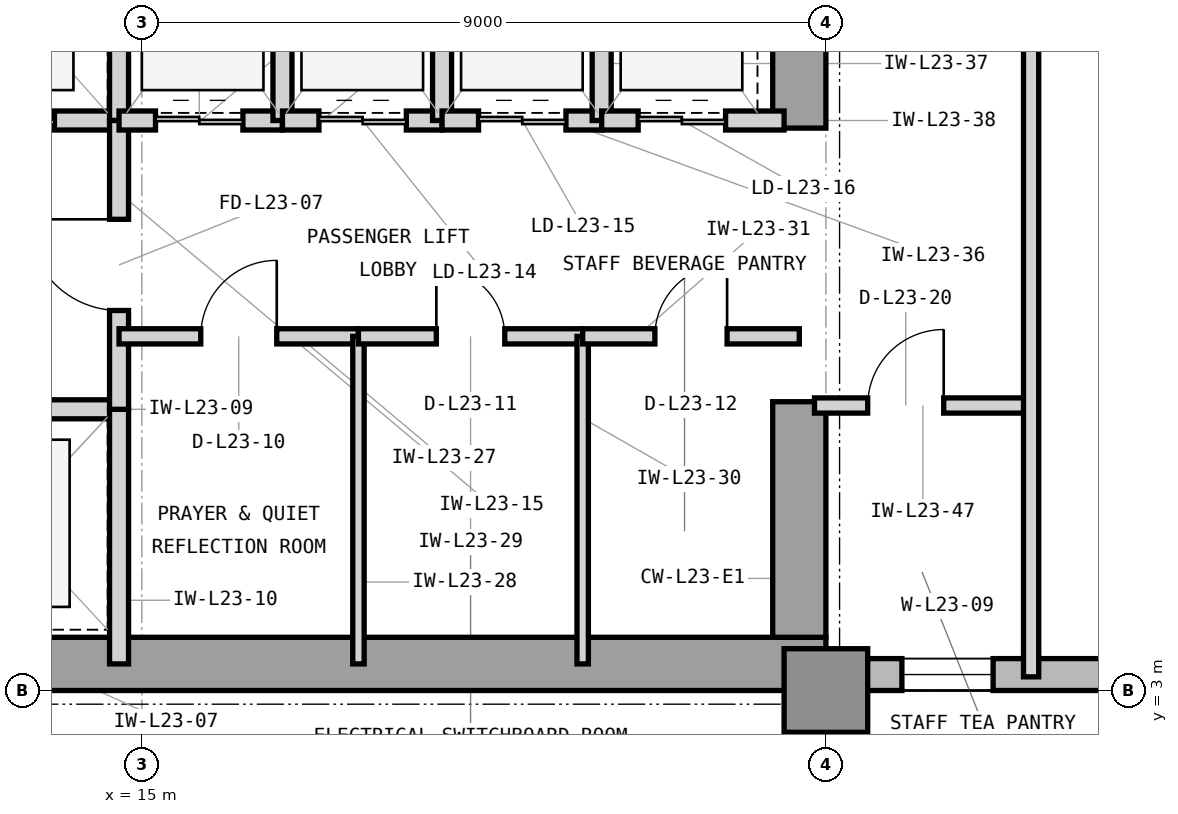
"""IFC4 building model, lengths in metres.
Left out: names, types, materials, properties, quantities, classifications, styles, units other than length and angle.
Written with IfcOpenShell. Run it as: python <this file> out.ifc"""

import sys

from ifc_helpers import new_model, si_unit, direction, frame, frame_2d, origin, origin_2d, place, context, subcontext, project, spatial, rectangle, extrude, element, fill, save


model = new_model("IFC4")
c1 = context("Model", 3, precision=1e-05, world=origin(), true_north=direction((0.0, 1.0)))
c2 = subcontext(c1, "Body", "Model", "MODEL_VIEW")
j1 = project(units=[si_unit("LENGTHUNIT", "METRE"), si_unit("PLANEANGLEUNIT", "RADIAN")], contexts=[c1])
p1 = place(None, origin())
s1 = spatial("IfcSite", under=j1, at=p1, CompositionType="ELEMENT")
p2 = place(p1, origin())
s2 = spatial("IfcBuilding", under=s1, at=p2, CompositionType="ELEMENT")
p3 = place(p2, frame((0.0, 0.0, 101.1)))
s3 = spatial("IfcBuildingStorey", under=s2, at=p3, CompositionType="ELEMENT", Elevation=101.1)
p4 = place(p3, frame((7.475, 3.35, 0.0), z_axis=(0.0, 0.0, 1.0), x_axis=(1.0, 0.0, 0.0)))
e1 = element("IfcWall", 1, at=p4, inside=s3, PredefinedType="SHEAR", context=c2, shape_type="SweptSolid", body=[
    extrude(rectangle(XDim=16.525, YDim=0.7, at=frame_2d((8.262, 0.0))), origin(), (0.0, 0.0, 1.0), 3.9),
])
p5 = place(p3, frame((23.65, 3.7, 0.0), z_axis=(0.0, 0.0, 1.0), x_axis=(0.0, 1.0, 0.0)))
e2 = element("IfcWall", 2, at=p5, inside=s3, PredefinedType="SHEAR", context=c2, shape_type="SweptSolid", body=[
    extrude(rectangle(XDim=3.1, YDim=0.7, at=frame_2d((1.55, 0.0))), origin(), (0.0, 0.0, 1.0), 3.9),
])
p6 = place(p3, frame((23.65, 10.4, 0.0), z_axis=(0.0, 0.0, 1.0), x_axis=(0.0, 1.0, 0.0)))
e3 = element("IfcWall", 3, at=p6, inside=s3, PredefinedType="SHEAR", context=c2, shape_type="SweptSolid", body=[
    extrude(rectangle(XDim=3.2, YDim=0.7, at=frame_2d((1.6, 0.0))), origin(), (0.0, 0.0, 1.0), 3.9),
])
p7 = place(p3, frame((24.0, 3.0, 0.0), z_axis=(0.0, 0.0, 1.0), x_axis=(1.0, 0.0, 0.0)))
e4 = element("IfcColumn", 4, at=p7, inside=s3, PredefinedType="COLUMN", context=c2, shape_type="SweptSolid", body=[
    extrude(rectangle(XDim=1.1, YDim=1.1, at=origin_2d()), origin(), (0.0, 0.0, 1.0), 3.9),
])
p8 = place(p3, frame((23.9, 3.21, 0.0), z_axis=(0.0, 0.0, 1.0), x_axis=(1.0, 0.0, 0.0)))
e5 = element("IfcWall", 5, at=p8, inside=s3, PredefinedType="STANDARD", context=c2, shape_type="SweptSolid", body=[
    extrude(rectangle(XDim=37.5, YDim=0.42, at=frame_2d((18.75, 0.0))), origin(), (0.0, 0.0, 1.0), 3.7),
])
p9 = place(p8, frame((19.844, 0.0, 0.85)))
e6 = element("IfcOpeningElement", 6, at=p9, cuts=e5, PredefinedType="OPENING", context=c2, shape_type="SweptSolid", body=[
    extrude(rectangle(XDim=2.5, YDim=2.25, at=frame_2d((1.25, 1.125))), frame((0.0, 0.22, 0.0), z_axis=(0.0, -1.0, 0.0), x_axis=(1.0, 0.0, 0.0)), (0.0, 0.0, 1.0), 0.44),
])
p10 = place(p8, frame((1.1, 0.0, 0.85)))
e7 = element("IfcOpeningElement", 7, at=p10, cuts=e5, PredefinedType="OPENING", context=c2, shape_type="SweptSolid", body=[
    extrude(rectangle(XDim=1.2, YDim=2.25, at=frame_2d((0.6, 1.125))), frame((0.0, 0.22, 0.0), z_axis=(0.0, -1.0, 0.0), x_axis=(1.0, 0.0, 0.0)), (0.0, 0.0, 1.0), 0.44),
])
p11 = place(p8, frame((5.286, 0.0, 0.85)))
e8 = element("IfcOpeningElement", 8, at=p11, cuts=e5, PredefinedType="OPENING", context=c2, shape_type="SweptSolid", body=[
    extrude(rectangle(XDim=2.5, YDim=2.25, at=frame_2d((1.25, 1.125))), frame((0.0, 0.22, 0.0), z_axis=(0.0, -1.0, 0.0), x_axis=(1.0, 0.0, 0.0)), (0.0, 0.0, 1.0), 0.44),
])
p12 = place(p8, frame((13.036, 0.0, 0.85)))
e9 = element("IfcOpeningElement", 9, at=p12, cuts=e5, PredefinedType="OPENING", context=c2, shape_type="SweptSolid", body=[
    extrude(rectangle(XDim=2.5, YDim=2.25, at=frame_2d((1.25, 1.125))), frame((0.0, 0.22, 0.0), z_axis=(0.0, -1.0, 0.0), x_axis=(1.0, 0.0, 0.0)), (0.0, 0.0, 1.0), 0.44),
])
p13 = place(p8, frame((27.986, 0.0, 0.85)))
e10 = element("IfcOpeningElement", 10, at=p13, cuts=e5, PredefinedType="OPENING", context=c2, shape_type="SweptSolid", body=[
    extrude(rectangle(XDim=1.2, YDim=2.25, at=frame_2d((0.6, 1.125))), frame((0.0, 0.22, 0.0), z_axis=(0.0, -1.0, 0.0), x_axis=(1.0, 0.0, 0.0)), (0.0, 0.0, 1.0), 0.44),
])
p14 = place(p3, frame((11.82, 6.7, 0.0), z_axis=(0.0, 0.0, 1.0), x_axis=(1.0, 0.0, 0.0)))
e11 = element("IfcWall", 11, at=p14, inside=s3, PredefinedType="PARTITIONING", context=c2, shape_type="SweptSolid", body=[
    extrude(rectangle(XDim=2.88, YDim=0.25, at=frame_2d((1.44, 0.0))), origin(), (0.0, 0.0, 1.0), 3.227),
])
p15 = place(p14, frame((0.85, 0.0, 0.0)))
e12 = element("IfcOpeningElement", 12, at=p15, cuts=e11, PredefinedType="OPENING", context=c2, shape_type="SweptSolid", body=[
    extrude(rectangle(XDim=1.1, YDim=2.25, at=frame_2d((0.55, 1.125))), frame((0.0, 0.135, 0.0), z_axis=(0.0, -1.0, 0.0), x_axis=(1.0, 0.0, 0.0)), (0.0, 0.0, 1.0), 0.27),
])
p16 = place(p3, frame((14.7, 3.35, 0.0), z_axis=(0.0, 0.0, 1.0), x_axis=(0.0, 1.0, 0.0)))
e13 = element("IfcWall", 13, at=p16, inside=s3, PredefinedType="PARTITIONING", context=c2, shape_type="SweptSolid", body=[
    extrude(rectangle(XDim=3.35, YDim=0.25, at=frame_2d((1.675, 0.0))), origin(), (0.0, 0.0, 1.0), 3.69),
])
p17 = place(p3, frame((11.95, 10.5, 0.0), z_axis=(0.0, 0.0, 1.0), x_axis=(1.0, 0.0, 0.0)))
e14 = element("IfcWall", 14, at=p17, inside=s3, PredefinedType="PARTITIONING", context=c2, shape_type="SweptSolid", body=[
    extrude(rectangle(XDim=2.75, YDim=0.25, at=frame_2d((1.375, 0.0))), origin(), (0.0, 0.0, 1.0), 3.227),
])
p18 = place(p17, frame((0.8, 0.0, 0.0)))
e15 = element("IfcOpeningElement", 15, at=p18, cuts=e14, PredefinedType="OPENING", context=c2, shape_type="SweptSolid", body=[
    extrude(rectangle(XDim=1.1, YDim=2.25, at=frame_2d((0.55, 1.125))), frame((0.0, 0.135, 0.0), z_axis=(0.0, -1.0, 0.0), x_axis=(1.0, 0.0, 0.0)), (0.0, 0.0, 1.0), 0.27),
])
p19 = place(p3, frame((14.7, 10.5, 0.0), z_axis=(0.0, 0.0, 1.0), x_axis=(0.0, 1.0, 0.0)))
e16 = element("IfcWall", 16, at=p19, inside=s3, PredefinedType="PARTITIONING", context=c2, shape_type="SweptSolid", body=[
    extrude(rectangle(XDim=3.0, YDim=0.25, at=frame_2d((1.5, 0.0))), origin(), (0.0, 0.0, 1.0), 3.69),
])
p20 = place(p3, frame((14.7, 6.7, 0.0), z_axis=(0.0, 0.0, 1.0), x_axis=(0.0, 1.0, 0.0)))
e17 = element("IfcWall", 17, at=p20, inside=s3, PredefinedType="PARTITIONING", context=c2, shape_type="SweptSolid", body=[
    extrude(rectangle(XDim=3.8, YDim=0.25, at=frame_2d((1.9, 0.0))), origin(), (0.0, 0.0, 1.0), 3.69),
])
p21 = place(p20, frame((1.3, 0.0, 0.0)))
e18 = element("IfcOpeningElement", 18, at=p21, cuts=e17, PredefinedType="OPENING", context=c2, shape_type="SweptSolid", body=[
    extrude(rectangle(XDim=1.2, YDim=2.2, at=frame_2d((0.6, 1.1))), frame((0.0, 0.135, 0.0), z_axis=(0.0, -1.0, 0.0), x_axis=(1.0, 0.0, 0.0)), (0.0, 0.0, 1.0), 0.27),
])
p22 = place(p3, frame((14.7, 7.66, 0.0), z_axis=(0.0, 0.0, 1.0), x_axis=(1.0, 0.0, 0.0)))
e19 = element("IfcWall", 19, at=p22, inside=s3, PredefinedType="PARTITIONING", context=c2, shape_type="SweptSolid", body=[
    extrude(rectangle(XDim=3.15, YDim=0.2, at=frame_2d((1.575, 0.0))), origin(), (0.0, 0.0, 1.0), 3.69),
])
p23 = place(p22, frame((1.075, 0.0, 0.0)))
e20 = element("IfcOpeningElement", 20, at=p23, cuts=e19, PredefinedType="OPENING", context=c2, shape_type="SweptSolid", body=[
    extrude(rectangle(XDim=1.0, YDim=2.15, at=frame_2d((0.5, 1.075))), frame((0.0, 0.11, 0.0), z_axis=(0.0, -1.0, 0.0), x_axis=(1.0, 0.0, 0.0)), (0.0, 0.0, 1.0), 0.22),
])
p24 = place(p3, frame((17.85, 3.35, 0.0), z_axis=(0.0, 0.0, 1.0), x_axis=(0.0, 1.0, 0.0)))
e21 = element("IfcWall", 21, at=p24, inside=s3, PredefinedType="PARTITIONING", context=c2, shape_type="SweptSolid", body=[
    extrude(rectangle(XDim=4.31, YDim=0.15, at=frame_2d((2.155, 0.0))), origin(), (0.0, 0.0, 1.0), 3.69),
])
p25 = place(p3, frame((17.85, 7.66, 0.0), z_axis=(0.0, 0.0, 1.0), x_axis=(1.0, 0.0, 0.0)))
e22 = element("IfcWall", 22, at=p25, inside=s3, PredefinedType="PARTITIONING", context=c2, shape_type="SweptSolid", body=[
    extrude(rectangle(XDim=2.95, YDim=0.2, at=frame_2d((1.475, 0.0))), origin(), (0.0, 0.0, 1.0), 3.69),
])
p26 = place(p25, frame((1.025, 0.0, 0.0)))
e23 = element("IfcOpeningElement", 23, at=p26, cuts=e22, PredefinedType="OPENING", context=c2, shape_type="SweptSolid", body=[
    extrude(rectangle(XDim=0.9, YDim=2.1, at=frame_2d((0.45, 1.05))), frame((0.0, 0.11, 0.0), z_axis=(0.0, -1.0, 0.0), x_axis=(1.0, 0.0, 0.0)), (0.0, 0.0, 1.0), 0.22),
])
p27 = place(p3, frame((20.8, 3.35, 0.0), z_axis=(0.0, 0.0, 1.0), x_axis=(0.0, 1.0, 0.0)))
e24 = element("IfcWall", 24, at=p27, inside=s3, PredefinedType="PARTITIONING", context=c2, shape_type="SweptSolid", body=[
    extrude(rectangle(XDim=4.31, YDim=0.15, at=frame_2d((2.155, 0.0))), origin(), (0.0, 0.0, 1.0), 3.69),
])
p28 = place(p3, frame((20.8, 7.66, 0.0), z_axis=(0.0, 0.0, 1.0), x_axis=(1.0, 0.0, 0.0)))
e25 = element("IfcWall", 25, at=p28, inside=s3, PredefinedType="PARTITIONING", context=c2, shape_type="SweptSolid", body=[
    extrude(rectangle(XDim=2.85, YDim=0.2, at=frame_2d((1.425, 0.0))), origin(), (0.0, 0.0, 1.0), 3.69),
])
p29 = place(p28, frame((0.95, 0.0, 0.0)))
e26 = element("IfcOpeningElement", 26, at=p29, cuts=e25, PredefinedType="OPENING", context=c2, shape_type="SweptSolid", body=[
    extrude(rectangle(XDim=0.95, YDim=2.1, at=frame_2d((0.475, 1.05))), frame((0.0, 0.11, 0.0), z_axis=(0.0, -1.0, 0.0), x_axis=(1.0, 0.0, 0.0)), (0.0, 0.0, 1.0), 0.22),
])
p30 = place(p3, frame((14.7, 10.5, 0.0), z_axis=(0.0, 0.0, 1.0), x_axis=(1.0, 0.0, 0.0)))
e27 = element("IfcWall", 27, at=p30, inside=s3, PredefinedType="PARTITIONING", context=c2, shape_type="SweptSolid", body=[
    extrude(rectangle(XDim=2.15, YDim=0.25, at=frame_2d((1.075, 0.0))), origin(), (0.0, 0.0, 1.0), 3.227),
])
p31 = place(p30, frame((0.48, 0.0, 0.0)))
e28 = element("IfcOpeningElement", 28, at=p31, cuts=e27, PredefinedType="OPENING", context=c2, shape_type="SweptSolid", body=[
    extrude(rectangle(XDim=1.15, YDim=2.25, at=frame_2d((0.575, 1.125))), frame((0.0, 0.135, 0.0), z_axis=(0.0, -1.0, 0.0), x_axis=(1.0, 0.0, 0.0)), (0.0, 0.0, 1.0), 0.27),
])
p32 = place(p3, frame((16.85, 10.5, 0.0), z_axis=(0.0, 0.0, 1.0), x_axis=(0.0, 1.0, 0.0)))
e29 = element("IfcWall", 29, at=p32, inside=s3, PredefinedType="PARTITIONING", context=c2, shape_type="SweptSolid", body=[
    extrude(rectangle(XDim=3.0, YDim=0.25, at=frame_2d((1.5, 0.0))), origin(), (0.0, 0.0, 1.0), 3.69),
])
p33 = place(p3, frame((16.85, 10.5, 0.0), z_axis=(0.0, 0.0, 1.0), x_axis=(1.0, 0.0, 0.0)))
e30 = element("IfcWall", 30, at=p33, inside=s3, PredefinedType="PARTITIONING", context=c2, shape_type="SweptSolid", body=[
    extrude(rectangle(XDim=2.1, YDim=0.25, at=frame_2d((1.05, 0.0))), origin(), (0.0, 0.0, 1.0), 3.227),
])
p34 = place(p33, frame((0.48, 0.0, 0.0)))
e31 = element("IfcOpeningElement", 31, at=p34, cuts=e30, PredefinedType="OPENING", context=c2, shape_type="SweptSolid", body=[
    extrude(rectangle(XDim=1.15, YDim=2.25, at=frame_2d((0.575, 1.125))), frame((0.0, 0.135, 0.0), z_axis=(0.0, -1.0, 0.0), x_axis=(1.0, 0.0, 0.0)), (0.0, 0.0, 1.0), 0.27),
])
p35 = place(p3, frame((18.95, 10.5, 0.0), z_axis=(0.0, 0.0, 1.0), x_axis=(0.0, 1.0, 0.0)))
e32 = element("IfcWall", 32, at=p35, inside=s3, PredefinedType="PARTITIONING", context=c2, shape_type="SweptSolid", body=[
    extrude(rectangle(XDim=3.0, YDim=0.25, at=frame_2d((1.5, 0.0))), origin(), (0.0, 0.0, 1.0), 3.69),
])
p36 = place(p3, frame((18.95, 10.5, 0.0), z_axis=(0.0, 0.0, 1.0), x_axis=(1.0, 0.0, 0.0)))
e33 = element("IfcWall", 33, at=p36, inside=s3, PredefinedType="PARTITIONING", context=c2, shape_type="SweptSolid", body=[
    extrude(rectangle(XDim=2.1, YDim=0.25, at=frame_2d((1.05, 0.0))), origin(), (0.0, 0.0, 1.0), 3.227),
])
p37 = place(p36, frame((0.48, 0.0, 0.0)))
e34 = element("IfcOpeningElement", 34, at=p37, cuts=e33, PredefinedType="OPENING", context=c2, shape_type="SweptSolid", body=[
    extrude(rectangle(XDim=1.15, YDim=2.25, at=frame_2d((0.575, 1.125))), frame((0.0, 0.135, 0.0), z_axis=(0.0, -1.0, 0.0), x_axis=(1.0, 0.0, 0.0)), (0.0, 0.0, 1.0), 0.27),
])
p38 = place(p3, frame((21.05, 10.5, 0.0), z_axis=(0.0, 0.0, 1.0), x_axis=(0.0, 1.0, 0.0)))
e35 = element("IfcWall", 35, at=p38, inside=s3, PredefinedType="PARTITIONING", context=c2, shape_type="SweptSolid", body=[
    extrude(rectangle(XDim=3.0, YDim=0.25, at=frame_2d((1.5, 0.0))), origin(), (0.0, 0.0, 1.0), 3.69),
])
p39 = place(p3, frame((21.05, 10.5, 0.0), z_axis=(0.0, 0.0, 1.0), x_axis=(1.0, 0.0, 0.0)))
e36 = element("IfcWall", 36, at=p39, inside=s3, PredefinedType="PARTITIONING", context=c2, shape_type="SweptSolid", body=[
    extrude(rectangle(XDim=2.4, YDim=0.25, at=frame_2d((1.2, 0.0))), origin(), (0.0, 0.0, 1.0), 3.227),
])
p40 = place(p39, frame((0.48, 0.0, 0.0)))
e37 = element("IfcOpeningElement", 37, at=p40, cuts=e36, PredefinedType="OPENING", context=c2, shape_type="SweptSolid", body=[
    extrude(rectangle(XDim=1.15, YDim=2.25, at=frame_2d((0.575, 1.125))), frame((0.0, 0.135, 0.0), z_axis=(0.0, -1.0, 0.0), x_axis=(1.0, 0.0, 0.0)), (0.0, 0.0, 1.0), 0.27),
])
p41 = place(p3, frame((23.85, 6.75, 0.0), z_axis=(0.0, 0.0, 1.0), x_axis=(1.0, 0.0, 0.0)))
e38 = element("IfcWall", 38, at=p41, inside=s3, PredefinedType="PARTITIONING", context=c2, shape_type="SweptSolid", body=[
    extrude(rectangle(XDim=2.85, YDim=0.2, at=frame_2d((1.425, 0.0))), origin(), (0.0, 0.0, 1.0), 3.69),
])
p42 = place(p41, frame((0.7, 0.0, 0.0)))
e39 = element("IfcOpeningElement", 39, at=p42, cuts=e38, PredefinedType="OPENING", context=c2, shape_type="SweptSolid", body=[
    extrude(rectangle(XDim=1.0, YDim=2.15, at=frame_2d((0.5, 1.075))), frame((0.0, 0.11, 0.0), z_axis=(0.0, -1.0, 0.0), x_axis=(1.0, 0.0, 0.0)), (0.0, 0.0, 1.0), 0.22),
])
p43 = place(p3, frame((26.7, 3.18, 0.0), z_axis=(0.0, 0.0, 1.0), x_axis=(0.0, 1.0, 0.0)))
e40 = element("IfcWall", 40, at=p43, inside=s3, PredefinedType="PARTITIONING", context=c2, shape_type="SweptSolid", body=[
    extrude(rectangle(XDim=14.82, YDim=0.2, at=frame_2d((7.41, 0.0))), origin(), (0.0, 0.0, 1.0), 3.69),
])
p44 = place(p18, origin())
e41 = element("IfcDoor", 41, at=p44, inside=s3, OperationType="DOUBLE_DOOR_SLIDING", PredefinedType="DOOR", context=c2, shape_type="SweptSolid", body=[
    extrude(rectangle(XDim=1.1, YDim=2.25, at=frame_2d((0.55, 1.125))), frame((0.0, 0.025, 0.0), z_axis=(0.0, -1.0, 0.0), x_axis=(1.0, 0.0, 0.0)), (0.0, 0.0, 1.0), 0.05),
])
fill(e15, e41)
p45 = place(p21, origin())
e42 = element("IfcDoor", 42, at=p45, inside=s3, OperationType="SINGLE_SWING_RIGHT", PredefinedType="DOOR", context=c2, shape_type="SweptSolid", body=[
    extrude(rectangle(XDim=1.2, YDim=2.2, at=frame_2d((0.6, 1.1))), frame((0.0, 0.025, 0.0), z_axis=(0.0, -1.0, 0.0), x_axis=(1.0, 0.0, 0.0)), (0.0, 0.0, 1.0), 0.05),
])
fill(e18, e42)
p46 = place(p23, origin())
e43 = element("IfcDoor", 43, at=p46, inside=s3, OperationType="SINGLE_SWING_RIGHT", PredefinedType="DOOR", context=c2, shape_type="SweptSolid", body=[
    extrude(rectangle(XDim=1.0, YDim=2.15, at=frame_2d((0.5, 1.075))), frame((0.0, 0.025, 0.0), z_axis=(0.0, -1.0, 0.0), x_axis=(1.0, 0.0, 0.0)), (0.0, 0.0, 1.0), 0.05),
])
fill(e20, e43)
p47 = place(p26, origin())
e44 = element("IfcDoor", 44, at=p47, inside=s3, OperationType="SINGLE_SWING_LEFT", PredefinedType="TRAPDOOR", context=c2, shape_type="SweptSolid", body=[
    extrude(rectangle(XDim=0.9, YDim=2.1, at=frame_2d((0.45, 1.05))), frame((0.0, 0.025, 0.0), z_axis=(0.0, -1.0, 0.0), x_axis=(1.0, 0.0, 0.0)), (0.0, 0.0, 1.0), 0.05),
])
fill(e23, e44)
p48 = place(p29, origin())
e45 = element("IfcDoor", 45, at=p48, inside=s3, OperationType="SINGLE_SWING_RIGHT", PredefinedType="DOOR", context=c2, shape_type="SweptSolid", body=[
    extrude(rectangle(XDim=0.95, YDim=2.1, at=frame_2d((0.475, 1.05))), frame((0.0, 0.025, 0.0), z_axis=(0.0, -1.0, 0.0), x_axis=(1.0, 0.0, 0.0)), (0.0, 0.0, 1.0), 0.05),
])
fill(e26, e45)
p49 = place(p31, origin())
e46 = element("IfcDoor", 46, at=p49, inside=s3, OperationType="DOUBLE_DOOR_SLIDING", PredefinedType="DOOR", context=c2, shape_type="SweptSolid", body=[
    extrude(rectangle(XDim=1.15, YDim=2.25, at=frame_2d((0.575, 1.125))), frame((0.0, 0.025, 0.0), z_axis=(0.0, -1.0, 0.0), x_axis=(1.0, 0.0, 0.0)), (0.0, 0.0, 1.0), 0.05),
])
fill(e28, e46)
p50 = place(p34, origin())
e47 = element("IfcDoor", 47, at=p50, inside=s3, OperationType="DOUBLE_DOOR_SLIDING", PredefinedType="DOOR", context=c2, shape_type="SweptSolid", body=[
    extrude(rectangle(XDim=1.15, YDim=2.25, at=frame_2d((0.575, 1.125))), frame((0.0, 0.025, 0.0), z_axis=(0.0, -1.0, 0.0), x_axis=(1.0, 0.0, 0.0)), (0.0, 0.0, 1.0), 0.05),
])
fill(e31, e47)
p51 = place(p37, origin())
e48 = element("IfcDoor", 48, at=p51, inside=s3, OperationType="DOUBLE_DOOR_SLIDING", PredefinedType="DOOR", context=c2, shape_type="SweptSolid", body=[
    extrude(rectangle(XDim=1.15, YDim=2.25, at=frame_2d((0.575, 1.125))), frame((0.0, 0.025, 0.0), z_axis=(0.0, -1.0, 0.0), x_axis=(1.0, 0.0, 0.0)), (0.0, 0.0, 1.0), 0.05),
])
fill(e34, e48)
p52 = place(p40, origin())
e49 = element("IfcDoor", 49, at=p52, inside=s3, OperationType="DOUBLE_DOOR_SLIDING", PredefinedType="DOOR", context=c2, shape_type="SweptSolid", body=[
    extrude(rectangle(XDim=1.15, YDim=2.25, at=frame_2d((0.575, 1.125))), frame((0.0, 0.025, 0.0), z_axis=(0.0, -1.0, 0.0), x_axis=(1.0, 0.0, 0.0)), (0.0, 0.0, 1.0), 0.05),
])
fill(e37, e49)
p53 = place(p42, origin())
e50 = element("IfcDoor", 50, at=p53, inside=s3, OperationType="SINGLE_SWING_RIGHT", PredefinedType="DOOR", context=c2, shape_type="SweptSolid", body=[
    extrude(rectangle(XDim=1.0, YDim=2.15, at=frame_2d((0.5, 1.075))), frame((0.0, 0.025, 0.0), z_axis=(0.0, -1.0, 0.0), x_axis=(1.0, 0.0, 0.0)), (0.0, 0.0, 1.0), 0.05),
])
fill(e39, e50)
p54 = place(p10, origin())
e51 = element("IfcWindow", 51, at=p54, inside=s3, PartitioningType="SINGLE_PANEL", PredefinedType="WINDOW", context=c2, shape_type="SweptSolid", body=[
    extrude(rectangle(XDim=1.2, YDim=2.25, at=frame_2d((0.6, 1.125))), frame((0.0, 0.11, 0.0), z_axis=(0.0, -1.0, 0.0), x_axis=(1.0, 0.0, 0.0)), (0.0, 0.0, 1.0), 0.06),
])
fill(e7, e51)
save(model, sys.argv[1])
